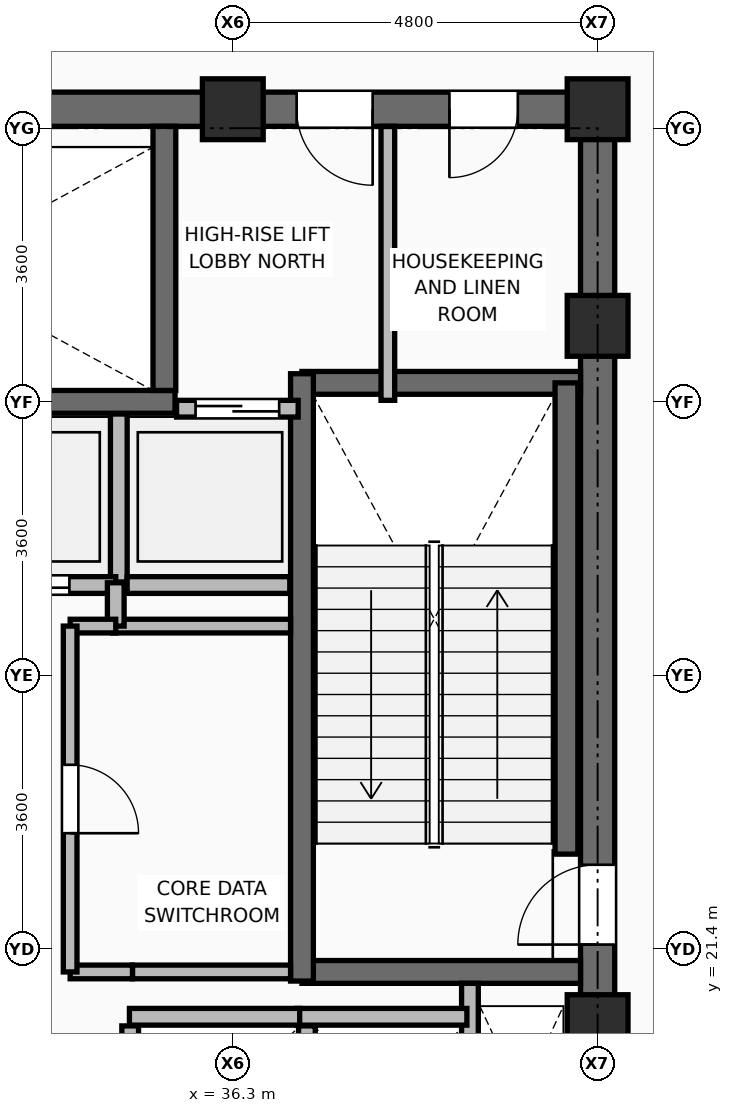
"""IFC4 building model, lengths in metres.
Left out: names, types, materials, properties, quantities, classifications, styles, units other than length and angle.
Written with IfcOpenShell. Run it as: python <this file> out.ifc"""

import sys

from ifc_helpers import new_model, si_unit, direction, frame, frame_2d, origin, origin_2d, place, context, subcontext, project, spatial, rectangle, extrude, element, fill, save


model = new_model("IFC4")
c1 = context("Model", 3, precision=1e-05, world=origin(), true_north=direction((0.0, 1.0)))
c2 = subcontext(c1, "Body", "Model", "MODEL_VIEW")
j1 = project(units=[si_unit("LENGTHUNIT", "METRE"), si_unit("PLANEANGLEUNIT", "RADIAN")], contexts=[c1])
p1 = place(None, origin())
s1 = spatial("IfcSite", under=j1, at=p1, CompositionType="ELEMENT")
p2 = place(p1, origin())
s2 = spatial("IfcBuilding", under=s1, at=p2, CompositionType="ELEMENT")
p3 = place(p2, frame((0.0, 0.0, 253.65)))
s3 = spatial("IfcBuildingStorey", under=s2, at=p3, CompositionType="ELEMENT", Elevation=253.65)
for number, where, z_axis, x_axis in (
    (1, (41.1, 20.4, 0.0), (0.0, 0.0, 1.0), (1.0, 0.0, 0.0)),
    (2, (41.1, 29.6, 0.0), (0.0, 0.0, 1.0), (1.0, 0.0, 0.0)),
    (3, (36.3, 32.45, 0.0), (0.0, 0.0, 1.0), (1.0, 0.0, 0.0)),
    (4, (41.1, 32.45, 0.0), (0.0, 0.0, 1.0), (1.0, 0.0, 0.0)),
):
    element("IfcColumn", number, at=place(p3, frame(where, z_axis=z_axis, x_axis=x_axis)), inside=s3, PredefinedType="COLUMN", context=c2, shape_type="SweptSolid", body=[
        extrude(rectangle(XDim=0.8, YDim=0.8, at=origin_2d()), origin(), (0.0, 0.0, 1.0), 5.4),
    ])
p4 = place(p3, frame((34.95, 17.92, 0.0), z_axis=(0.0, 0.0, 1.0), x_axis=(0.0, 1.0, 0.0)))
e5 = element("IfcWall", 5, at=p4, inside=s3, PredefinedType="PARTITIONING", context=c2, shape_type="SweptSolid", body=[
    extrude(rectangle(XDim=2.47, YDim=0.22, at=frame_2d((1.235, 0.0))), origin(), (0.0, 0.0, 1.0), 5.195),
])
p5 = place(p3, frame((37.275, 18.08, 0.0), z_axis=(0.0, 0.0, 1.0), x_axis=(0.0, 1.0, 0.0)))
e6 = element("IfcWall", 6, at=p5, inside=s3, PredefinedType="PARTITIONING", context=c2, shape_type="SweptSolid", body=[
    extrude(rectangle(XDim=2.31, YDim=0.22, at=frame_2d((1.155, 0.0))), origin(), (0.0, 0.0, 1.0), 5.195),
])
p6 = place(p3, frame((34.8, 26.23, 0.0), z_axis=(0.0, 0.0, 1.0), x_axis=(0.0, 1.0, 0.0)))
e7 = element("IfcWall", 7, at=p6, inside=s3, PredefinedType="PARTITIONING", context=c2, shape_type="SweptSolid", body=[
    extrude(rectangle(XDim=2.21, YDim=0.22, at=frame_2d((1.105, 0.0))), origin(), (0.0, 0.0, 1.0), 5.195),
])
p7 = place(p3, frame((34.91, 26.19, 0.0), z_axis=(0.0, 0.0, 1.0), x_axis=(1.0, 0.0, 0.0)))
e8 = element("IfcWall", 8, at=p7, inside=s3, PredefinedType="PARTITIONING", context=c2, shape_type="SweptSolid", body=[
    extrude(rectangle(XDim=2.14, YDim=0.22, at=frame_2d((1.07, 0.0))), origin(), (0.0, 0.0, 1.0), 5.195),
])
p8 = place(p3, frame((21.675, 32.45, 0.0), z_axis=(0.0, 0.0, 1.0), x_axis=(1.0, 0.0, 0.0)))
e9 = element("IfcWall", 9, at=p8, inside=s3, PredefinedType="SHEAR", context=c2, shape_type="SweptSolid", body=[
    extrude(rectangle(XDim=19.65, YDim=0.45, at=frame_2d((9.825, 0.0))), origin(), (0.0, 0.0, 1.0), 5.22),
])
p9 = place(p8, frame((2.075, 0.0, 0.0)))
e10 = element("IfcOpeningElement", 10, at=p9, cuts=e9, PredefinedType="OPENING", context=c2, shape_type="SweptSolid", body=[
    extrude(rectangle(XDim=1.1, YDim=2.1, at=frame_2d((0.55, 1.05))), frame((0.0, 0.235, 0.0), z_axis=(0.0, -1.0, 0.0), x_axis=(1.0, 0.0, 0.0)), (0.0, 0.0, 1.0), 0.47),
])
p10 = place(p8, frame((15.465, 0.0, 0.0)))
e11 = element("IfcOpeningElement", 11, at=p10, cuts=e9, PredefinedType="OPENING", context=c2, shape_type="SweptSolid", body=[
    extrude(rectangle(XDim=1.0, YDim=2.1, at=frame_2d((0.5, 1.05))), frame((0.0, 0.235, 0.0), z_axis=(0.0, -1.0, 0.0), x_axis=(1.0, 0.0, 0.0)), (0.0, 0.0, 1.0), 0.47),
])
p11 = place(p8, frame((17.475, 0.0, 0.0)))
e12 = element("IfcOpeningElement", 12, at=p11, cuts=e9, PredefinedType="OPENING", context=c2, shape_type="SweptSolid", body=[
    extrude(rectangle(XDim=0.9, YDim=2.1, at=frame_2d((0.45, 1.05))), frame((0.0, 0.235, 0.0), z_axis=(0.0, -1.0, 0.0), x_axis=(1.0, 0.0, 0.0)), (0.0, 0.0, 1.0), 0.47),
])
p12 = place(p3, frame((41.1, 18.025, 0.0), z_axis=(0.0, 0.0, 1.0), x_axis=(0.0, 1.0, 0.0)))
e13 = element("IfcWall", 13, at=p12, inside=s3, PredefinedType="SHEAR", context=c2, shape_type="SweptSolid", body=[
    extrude(rectangle(XDim=14.2, YDim=0.45, at=frame_2d((7.1, 0.0))), origin(), (0.0, 0.0, 1.0), 5.22),
])
p13 = place(p12, frame((3.435, 0.0, 0.0)))
e14 = element("IfcOpeningElement", 14, at=p13, cuts=e13, PredefinedType="OPENING", context=c2, shape_type="SweptSolid", body=[
    extrude(rectangle(XDim=1.05, YDim=2.1, at=frame_2d((0.525, 1.05))), frame((0.0, 0.235, 0.0), z_axis=(0.0, -1.0, 0.0), x_axis=(1.0, 0.0, 0.0)), (0.0, 0.0, 1.0), 0.47),
])
for number, where, z_axis, x_axis in (
    (15, (37.21, 21.1, 0.0), (0.0, 0.0, 1.0), (1.0, 0.0, 0.0)),
    (16, (37.21, 28.85, 0.0), (0.0, 0.0, 1.0), (1.0, 0.0, 0.0)),
):
    element("IfcWall", number, at=place(p3, frame(where, z_axis=z_axis, x_axis=x_axis)), inside=s3, PredefinedType="SHEAR", context=c2, shape_type="SweptSolid", body=[
        extrude(rectangle(XDim=3.665, YDim=0.3, at=frame_2d((1.833, 0.0))), origin(), (0.0, 0.0, 1.0), 5.22),
    ])
p14 = place(p3, frame((37.21, 20.98, 0.0), z_axis=(0.0, 0.0, 1.0), x_axis=(0.0, 1.0, 0.0)))
e17 = element("IfcWall", 17, at=p14, inside=s3, PredefinedType="SHEAR", context=c2, shape_type="SweptSolid", body=[
    extrude(rectangle(XDim=7.99, YDim=0.3, at=frame_2d((3.995, 0.0))), origin(), (0.0, 0.0, 1.0), 5.22),
])
p15 = place(p3, frame((40.69, 22.65, 0.0), z_axis=(0.0, 0.0, 1.0), x_axis=(0.0, 1.0, 0.0)))
e18 = element("IfcWall", 18, at=p15, inside=s3, PredefinedType="SHEAR", context=c2, shape_type="SweptSolid", body=[
    extrude(rectangle(XDim=6.2, YDim=0.3, at=frame_2d((3.1, 0.0))), origin(), (0.0, 0.0, 1.0), 5.22),
])
p16 = place(p3, frame((27.51, 28.6, 0.0), z_axis=(0.0, 0.0, 1.0), x_axis=(1.0, 0.0, 0.0)))
e19 = element("IfcWall", 19, at=p16, inside=s3, PredefinedType="SHEAR", context=c2, shape_type="SweptSolid", body=[
    extrude(rectangle(XDim=8.03, YDim=0.3, at=frame_2d((4.015, 0.0))), origin(), (0.0, 0.0, 1.0), 5.22),
])
p17 = place(p3, frame((35.4, 28.75, 0.0), z_axis=(0.0, 0.0, 1.0), x_axis=(0.0, 1.0, 0.0)))
e20 = element("IfcWall", 20, at=p17, inside=s3, PredefinedType="SHEAR", context=c2, shape_type="SweptSolid", body=[
    extrude(rectangle(XDim=3.475, YDim=0.3, at=frame_2d((1.738, 0.0))), origin(), (0.0, 0.0, 1.0), 5.22),
])
p18 = place(p3, frame((39.42, 18.025, 0.0), z_axis=(0.0, 0.0, 1.0), x_axis=(0.0, 1.0, 0.0)))
e21 = element("IfcWall", 21, at=p18, inside=s3, PredefinedType="PARTITIONING", context=c2, shape_type="SweptSolid", body=[
    extrude(rectangle(XDim=2.925, YDim=0.22, at=frame_2d((1.462, 0.0))), origin(), (0.0, 0.0, 1.0), 5.2),
])
for number, where, z_axis, x_axis in (
    (22, (37.14, 20.51, 0.0), (0.0, 0.0, 1.0), (1.0, 0.0, 0.0)),
    (23, (34.94, 20.51, 0.0), (0.0, 0.0, 1.0), (1.0, 0.0, 0.0)),
):
    element("IfcWall", number, at=place(p3, frame(where, z_axis=z_axis, x_axis=x_axis)), inside=s3, PredefinedType="PARTITIONING", context=c2, shape_type="SweptSolid", body=[
        extrude(rectangle(XDim=2.24, YDim=0.22, at=frame_2d((1.12, 0.0))), origin(), (0.0, 0.0, 1.0), 5.2),
    ])
p19 = place(p3, frame((32.44, 26.19, 0.0), z_axis=(0.0, 0.0, 1.0), x_axis=(1.0, 0.0, 0.0)))
e24 = element("IfcWall", 24, at=p19, inside=s3, PredefinedType="PARTITIONING", context=c2, shape_type="SweptSolid", body=[
    extrude(rectangle(XDim=2.32, YDim=0.22, at=frame_2d((1.16, 0.0))), origin(), (0.0, 0.0, 1.0), 5.2),
])
p20 = place(p19, frame((0.61, 0.0, 0.0)))
e25 = element("IfcOpeningElement", 25, at=p20, cuts=e24, PredefinedType="OPENING", context=c2, shape_type="SweptSolid", body=[
    extrude(rectangle(XDim=1.1, YDim=2.2, at=frame_2d((0.55, 1.1))), frame((0.0, 0.12, 0.0), z_axis=(0.0, -1.0, 0.0), x_axis=(1.0, 0.0, 0.0)), (0.0, 0.0, 1.0), 0.24),
])
p21 = place(p3, frame((35.56, 28.51, 0.0), z_axis=(0.0, 0.0, 1.0), x_axis=(1.0, 0.0, 0.0)))
e26 = element("IfcWall", 26, at=p21, inside=s3, PredefinedType="PARTITIONING", context=c2, shape_type="SweptSolid", body=[
    extrude(rectangle(XDim=1.6, YDim=0.22, at=frame_2d((0.8, 0.0))), origin(), (0.0, 0.0, 1.0), 5.2),
])
p22 = place(p21, frame((0.25, 0.0, 0.0)))
e27 = element("IfcOpeningElement", 27, at=p22, cuts=e26, PredefinedType="OPENING", context=c2, shape_type="SweptSolid", body=[
    extrude(rectangle(XDim=1.1, YDim=2.2, at=frame_2d((0.55, 1.1))), frame((0.0, 0.12, 0.0), z_axis=(0.0, -1.0, 0.0), x_axis=(1.0, 0.0, 0.0)), (0.0, 0.0, 1.0), 0.24),
])
p23 = place(p3, frame((34.98, 21.1, 0.0), z_axis=(0.0, 0.0, 1.0), x_axis=(1.0, 0.0, 0.0)))
e28 = element("IfcWall", 28, at=p23, inside=s3, PredefinedType="PARTITIONING", context=c2, shape_type="SweptSolid", body=[
    extrude(rectangle(XDim=2.08, YDim=0.18, at=frame_2d((1.04, 0.0))), origin(), (0.0, 0.0, 1.0), 5.2),
])
p24 = place(p3, frame((34.72, 25.65, 0.0), z_axis=(0.0, 0.0, 1.0), x_axis=(1.0, 0.0, 0.0)))
e29 = element("IfcWall", 29, at=p24, inside=s3, PredefinedType="PARTITIONING", context=c2, shape_type="SweptSolid", body=[
    extrude(rectangle(XDim=2.34, YDim=0.18, at=frame_2d((1.17, 0.0))), origin(), (0.0, 0.0, 1.0), 5.2),
])
p25 = place(p3, frame((34.76, 25.65, 0.0), z_axis=(0.0, 0.0, 1.0), x_axis=(0.0, 1.0, 0.0)))
e30 = element("IfcWall", 30, at=p25, inside=s3, PredefinedType="PARTITIONING", context=c2, shape_type="SweptSolid", body=[
    extrude(rectangle(XDim=0.57, YDim=0.22, at=frame_2d((0.285, 0.0))), origin(), (0.0, 0.0, 1.0), 5.2),
])
p26 = place(p3, frame((34.16, 21.1, 0.0), z_axis=(0.0, 0.0, 1.0), x_axis=(1.0, 0.0, 0.0)))
e31 = element("IfcWall", 31, at=p26, inside=s3, PredefinedType="PARTITIONING", context=c2, shape_type="SweptSolid", body=[
    extrude(rectangle(XDim=0.82, YDim=0.18, at=frame_2d((0.41, 0.0))), origin(), (0.0, 0.0, 1.0), 5.2),
])
p27 = place(p3, frame((34.16, 25.65, 0.0), z_axis=(0.0, 0.0, 1.0), x_axis=(1.0, 0.0, 0.0)))
e32 = element("IfcWall", 32, at=p27, inside=s3, PredefinedType="PARTITIONING", context=c2, shape_type="SweptSolid", body=[
    extrude(rectangle(XDim=0.6, YDim=0.18, at=frame_2d((0.3, 0.0))), origin(), (0.0, 0.0, 1.0), 5.2),
])
p28 = place(p3, frame((34.16, 21.1, 0.0), z_axis=(0.0, 0.0, 1.0), x_axis=(0.0, 1.0, 0.0)))
e33 = element("IfcWall", 33, at=p28, inside=s3, PredefinedType="PARTITIONING", context=c2, shape_type="SweptSolid", body=[
    extrude(rectangle(XDim=4.55, YDim=0.18, at=frame_2d((2.275, 0.0))), origin(), (0.0, 0.0, 1.0), 5.2),
])
p29 = place(p28, frame((1.825, 0.0, 0.0)))
e34 = element("IfcOpeningElement", 34, at=p29, cuts=e33, PredefinedType="OPENING", context=c2, shape_type="SweptSolid", body=[
    extrude(rectangle(XDim=0.9, YDim=2.1, at=frame_2d((0.45, 1.05))), frame((0.0, 0.1, 0.0), z_axis=(0.0, -1.0, 0.0), x_axis=(1.0, 0.0, 0.0)), (0.0, 0.0, 1.0), 0.2),
])
p30 = place(p3, frame((38.34, 28.62, 0.0), z_axis=(0.0, 0.0, 1.0), x_axis=(0.0, 1.0, 0.0)))
e35 = element("IfcWall", 35, at=p30, inside=s3, PredefinedType="PARTITIONING", context=c2, shape_type="SweptSolid", body=[
    extrude(rectangle(XDim=3.605, YDim=0.18, at=frame_2d((1.802, 0.0))), origin(), (0.0, 0.0, 1.0), 5.2),
])
p31 = place(p13, origin())
e36 = element("IfcDoor", 36, at=p31, inside=s3, OperationType="SINGLE_SWING_LEFT", PredefinedType="DOOR", context=c2, shape_type="SweptSolid", body=[
    extrude(rectangle(XDim=1.05, YDim=2.1, at=frame_2d((0.525, 1.05))), frame((0.0, 0.025, 0.0), z_axis=(0.0, -1.0, 0.0), x_axis=(1.0, 0.0, 0.0)), (0.0, 0.0, 1.0), 0.05),
])
fill(e14, e36)
p32 = place(p20, frame((1.1, 0.0, 0.0), z_axis=(0.0, 0.0, 1.0), x_axis=(-1.0, 0.0, 0.0)))
e37 = element("IfcDoor", 37, at=p32, inside=s3, OperationType="DOUBLE_DOOR_SLIDING", PredefinedType="DOOR", context=c2, shape_type="SweptSolid", body=[
    extrude(rectangle(XDim=1.1, YDim=2.2, at=frame_2d((0.55, 1.1))), frame((0.0, 0.025, 0.0), z_axis=(0.0, -1.0, 0.0), x_axis=(1.0, 0.0, 0.0)), (0.0, 0.0, 1.0), 0.05),
])
fill(e25, e37)
p33 = place(p22, origin())
e38 = element("IfcDoor", 38, at=p33, inside=s3, OperationType="DOUBLE_DOOR_SLIDING", PredefinedType="DOOR", context=c2, shape_type="SweptSolid", body=[
    extrude(rectangle(XDim=1.1, YDim=2.2, at=frame_2d((0.55, 1.1))), frame((0.0, 0.025, 0.0), z_axis=(0.0, -1.0, 0.0), x_axis=(1.0, 0.0, 0.0)), (0.0, 0.0, 1.0), 0.05),
])
fill(e27, e38)
p34 = place(p29, frame((0.9, 0.0, 0.0), z_axis=(0.0, 0.0, 1.0), x_axis=(-1.0, 0.0, 0.0)))
e39 = element("IfcDoor", 39, at=p34, inside=s3, OperationType="SINGLE_SWING_RIGHT", PredefinedType="DOOR", context=c2, shape_type="SweptSolid", body=[
    extrude(rectangle(XDim=0.9, YDim=2.1, at=frame_2d((0.45, 1.05))), frame((0.0, 0.025, 0.0), z_axis=(0.0, -1.0, 0.0), x_axis=(1.0, 0.0, 0.0)), (0.0, 0.0, 1.0), 0.05),
])
fill(e34, e39)
p35 = place(p10, frame((1.0, 0.0, 0.0), z_axis=(0.0, 0.0, 1.0), x_axis=(-1.0, 0.0, 0.0)))
e40 = element("IfcDoor", 40, at=p35, inside=s3, OperationType="SINGLE_SWING_LEFT", PredefinedType="DOOR", context=c2, shape_type="SweptSolid", body=[
    extrude(rectangle(XDim=1.0, YDim=2.1, at=frame_2d((0.5, 1.05))), frame((0.0, 0.025, 0.0), z_axis=(0.0, -1.0, 0.0), x_axis=(1.0, 0.0, 0.0)), (0.0, 0.0, 1.0), 0.05),
])
fill(e11, e40)
p36 = place(p11, frame((0.9, 0.0, 0.0), z_axis=(0.0, 0.0, 1.0), x_axis=(-1.0, 0.0, 0.0)))
e41 = element("IfcDoor", 41, at=p36, inside=s3, OperationType="SINGLE_SWING_RIGHT", PredefinedType="DOOR", context=c2, shape_type="SweptSolid", body=[
    extrude(rectangle(XDim=0.9, YDim=2.1, at=frame_2d((0.45, 1.05))), frame((0.0, 0.025, 0.0), z_axis=(0.0, -1.0, 0.0), x_axis=(1.0, 0.0, 0.0)), (0.0, 0.0, 1.0), 0.05),
])
fill(e12, e41)
save(model, sys.argv[1])
